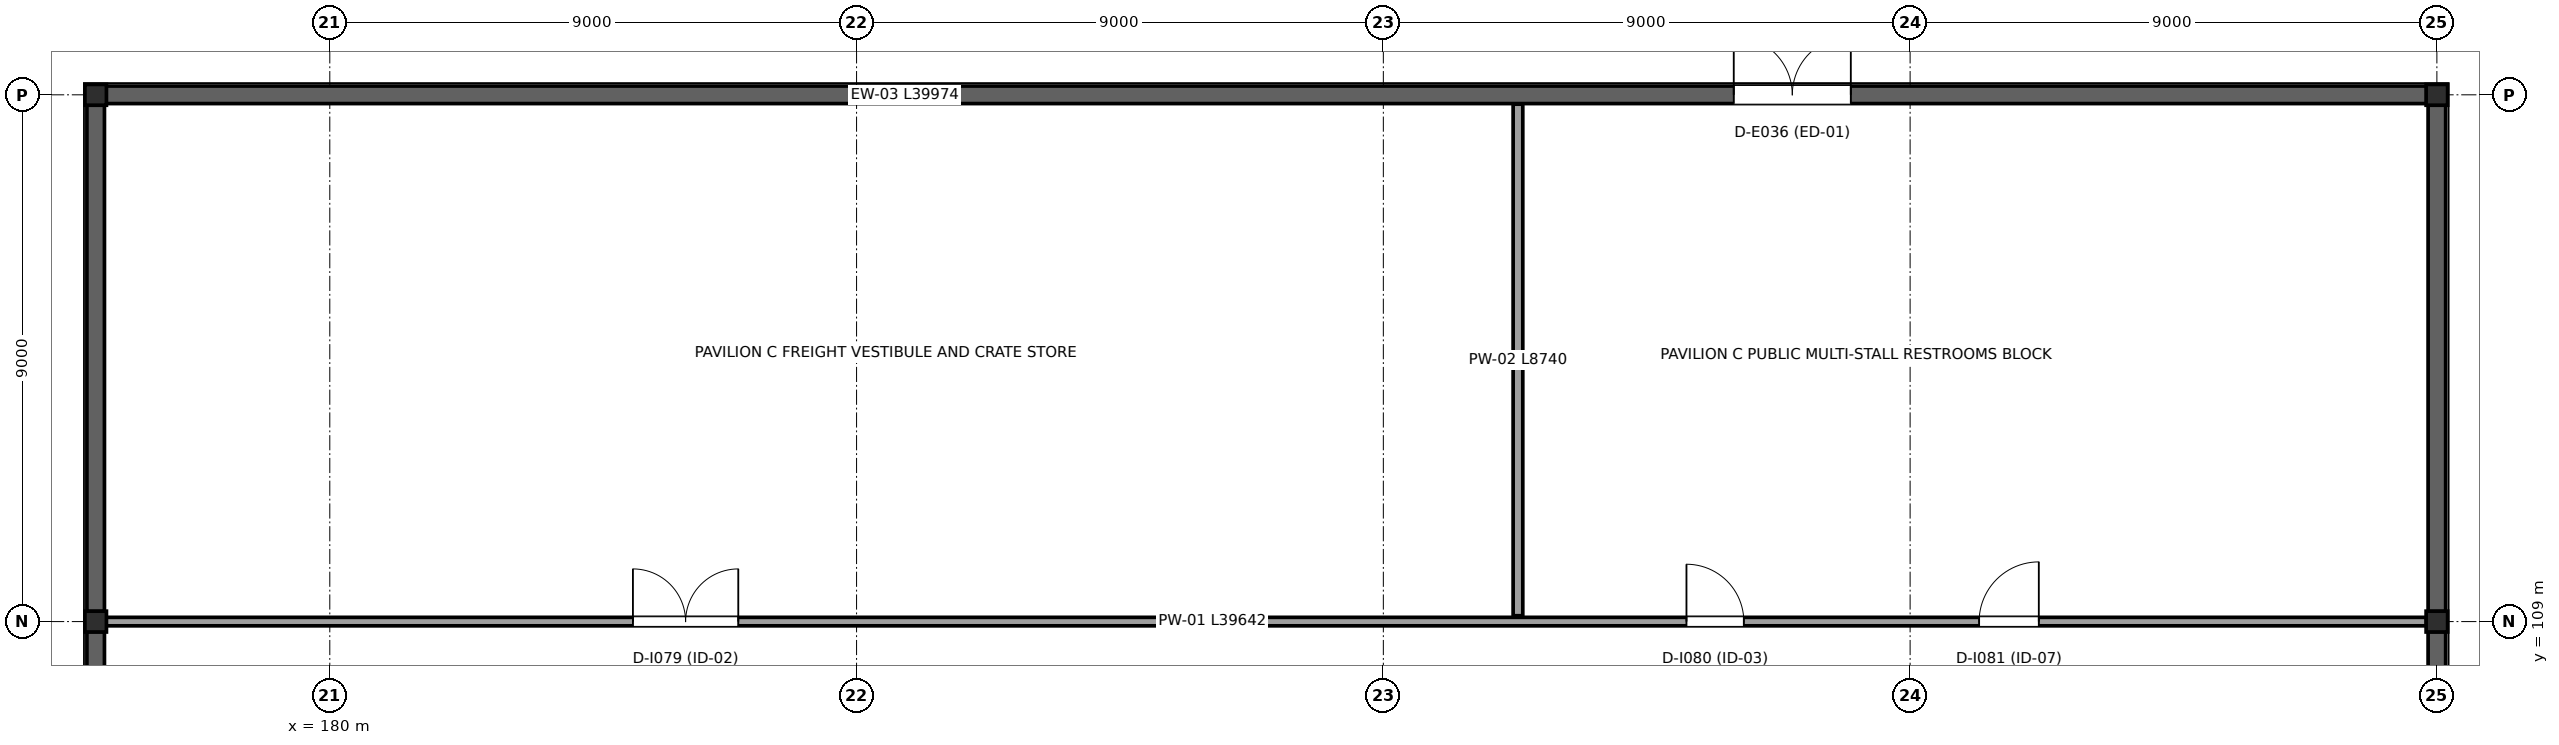
"""IFC4 building model, lengths in metres.
Left out: names, types, materials, properties, quantities, classifications, styles, units other than length and angle.
Written with IfcOpenShell. Run it as: python <this file> out.ifc"""

import sys

from ifc_helpers import new_model, si_unit, direction, frame, frame_2d, origin, origin_2d, place, context, subcontext, project, spatial, rectangle, i_section, extrude, element, fill, save


model = new_model("IFC4")
c1 = context("Model", 3, precision=1e-05, world=origin(), true_north=direction((0.0, 1.0)))
c2 = subcontext(c1, "Body", "Model", "MODEL_VIEW")
j1 = project(units=[si_unit("LENGTHUNIT", "METRE"), si_unit("PLANEANGLEUNIT", "RADIAN")], contexts=[c1])
p1 = place(None, origin())
s1 = spatial("IfcSite", under=j1, at=p1, CompositionType="ELEMENT")
p2 = place(p1, origin())
s2 = spatial("IfcBuilding", under=s1, at=p2, CompositionType="ELEMENT")
p3 = place(p2, origin())
s3 = spatial("IfcBuildingStorey", under=s2, at=p3, CompositionType="ELEMENT", Elevation=0.0)
for number, where, z_axis, x_axis in (
    (1, (176.0, 109.0, 0.0), (0.0, 0.0, 1.0), (1.0, 0.0, 0.0)),
    (2, (176.0, 118.0, 0.0), (0.0, 0.0, 1.0), (1.0, 0.0, 0.0)),
    (3, (216.0, 109.0, 0.0), (0.0, 0.0, 1.0), (1.0, 0.0, 0.0)),
    (4, (216.0, 118.0, 0.0), (0.0, 0.0, 1.0), (1.0, 0.0, 0.0)),
):
    element("IfcColumn", number, at=place(p3, frame(where, z_axis=z_axis, x_axis=x_axis)), inside=s3, PredefinedType="COLUMN", context=c2, shape_type="SweptSolid", body=[
        extrude(i_section(OverallWidth=0.368, OverallDepth=0.356, WebThickness=0.011, FlangeThickness=0.018, at=origin_2d()), origin(), (0.0, 0.0, 1.0), 6.0),
    ])
p4 = place(p3, frame((216.0, 108.828, 0.0), z_axis=(0.0, 0.0, 1.0), x_axis=(0.0, -1.0, 0.0)))
e5 = element("IfcWall", 5, at=p4, inside=s3, PredefinedType="STANDARD", context=c2, shape_type="SweptSolid", body=[
    extrude(rectangle(XDim=8.656, YDim=0.3, at=frame_2d((4.328, 0.0))), origin(), (0.0, 0.0, 1.0), 10.68),
])
p5 = place(p4, frame((3.356, 0.0, 0.0)))
e6 = element("IfcOpeningElement", 6, at=p5, cuts=e5, PredefinedType="OPENING", context=c2, shape_type="SweptSolid", body=[
    extrude(rectangle(XDim=2.4, YDim=2.6, at=frame_2d((1.2, 1.3))), frame((0.0, 0.16, 0.0), z_axis=(0.0, -1.0, 0.0), x_axis=(1.0, 0.0, 0.0)), (0.0, 0.0, 1.0), 0.32),
])
for number, where, z_axis, x_axis in (
    (7, (176.0, 100.172, 0.0), (0.0, 0.0, 1.0), (0.0, 1.0, 0.0)),
    (8, (216.0, 117.828, 0.0), (0.0, 0.0, 1.0), (0.0, -1.0, 0.0)),
    (9, (176.0, 109.172, 0.0), (0.0, 0.0, 1.0), (0.0, 1.0, 0.0)),
):
    element("IfcWall", number, at=place(p3, frame(where, z_axis=z_axis, x_axis=x_axis)), inside=s3, PredefinedType="STANDARD", context=c2, shape_type="SweptSolid", body=[
        extrude(rectangle(XDim=8.656, YDim=0.3, at=frame_2d((4.328, 0.0))), origin(), (0.0, 0.0, 1.0), 10.68),
    ])
p6 = place(p3, frame((176.013, 118.0, 0.0), z_axis=(0.0, 0.0, 1.0), x_axis=(1.0, 0.0, 0.0)))
e10 = element("IfcWall", 10, at=p6, inside=s3, PredefinedType="STANDARD", context=c2, shape_type="SweptSolid", body=[
    extrude(rectangle(XDim=39.974, YDim=0.3, at=frame_2d((19.987, 0.0))), origin(), (0.0, 0.0, 1.0), 10.8),
])
p7 = place(p6, frame((27.974, 0.0, 0.0)))
e11 = element("IfcOpeningElement", 11, at=p7, cuts=e10, PredefinedType="OPENING", context=c2, shape_type="SweptSolid", body=[
    extrude(rectangle(XDim=2.0, YDim=2.4, at=frame_2d((1.0, 1.2))), frame((0.0, 0.16, 0.0), z_axis=(0.0, -1.0, 0.0), x_axis=(1.0, 0.0, 0.0)), (0.0, 0.0, 1.0), 0.32),
])
p8 = place(p3, frame((176.179, 109.0, 0.0), z_axis=(0.0, 0.0, 1.0), x_axis=(1.0, 0.0, 0.0)))
e12 = element("IfcWall", 12, at=p8, inside=s3, PredefinedType="PARTITIONING", context=c2, shape_type="SweptSolid", body=[
    extrude(rectangle(XDim=39.642, YDim=0.145, at=frame_2d((19.821, 0.0))), origin(), (0.0, 0.0, 1.0), 8.8),
])
p9 = place(p8, frame((9.0, 0.0, 0.0)))
e13 = element("IfcOpeningElement", 13, at=p9, cuts=e12, PredefinedType="OPENING", context=c2, shape_type="SweptSolid", body=[
    extrude(rectangle(XDim=1.8, YDim=2.3, at=frame_2d((0.9, 1.15))), frame((0.0, 0.083, 0.0), z_axis=(0.0, -1.0, 0.0), x_axis=(1.0, 0.0, 0.0)), (0.0, 0.0, 1.0), 0.165),
])
p10 = place(p8, frame((27.0, 0.0, 0.0)))
e14 = element("IfcOpeningElement", 14, at=p10, cuts=e12, PredefinedType="OPENING", context=c2, shape_type="SweptSolid", body=[
    extrude(rectangle(XDim=0.98, YDim=2.15, at=frame_2d((0.49, 1.075))), frame((0.0, 0.083, 0.0), z_axis=(0.0, -1.0, 0.0), x_axis=(1.0, 0.0, 0.0)), (0.0, 0.0, 1.0), 0.165),
])
p11 = place(p8, frame((32.0, 0.0, 0.0)))
e15 = element("IfcOpeningElement", 15, at=p11, cuts=e12, PredefinedType="OPENING", context=c2, shape_type="SweptSolid", body=[
    extrude(rectangle(XDim=1.02, YDim=2.16, at=frame_2d((0.51, 1.08))), frame((0.0, 0.083, 0.0), z_axis=(0.0, -1.0, 0.0), x_axis=(1.0, 0.0, 0.0)), (0.0, 0.0, 1.0), 0.165),
])
p12 = place(p3, frame((200.3, 109.1, 0.0), z_axis=(0.0, 0.0, 1.0), x_axis=(0.0, 1.0, 0.0)))
e16 = element("IfcWall", 16, at=p12, inside=s3, PredefinedType="PARTITIONING", context=c2, shape_type="SweptSolid", body=[
    extrude(rectangle(XDim=8.74, YDim=0.165, at=frame_2d((4.37, 0.0))), origin(), (0.0, 0.0, 1.0), 8.8),
])
p13 = place(p7, origin())
e17 = element("IfcDoor", 17, at=p13, inside=s3, OperationType="DOUBLE_DOOR_SINGLE_SWING", PredefinedType="DOOR", context=c2, shape_type="SweptSolid", body=[
    extrude(rectangle(XDim=2.0, YDim=2.4, at=frame_2d((1.0, 1.2))), frame((0.0, 0.025, 0.0), z_axis=(0.0, -1.0, 0.0), x_axis=(1.0, 0.0, 0.0)), (0.0, 0.0, 1.0), 0.05),
])
fill(e11, e17)
p14 = place(p9, origin())
e18 = element("IfcDoor", 18, at=p14, inside=s3, OperationType="DOUBLE_DOOR_SINGLE_SWING", PredefinedType="DOOR", context=c2, shape_type="SweptSolid", body=[
    extrude(rectangle(XDim=1.8, YDim=2.3, at=frame_2d((0.9, 1.15))), frame((0.0, 0.025, 0.0), z_axis=(0.0, -1.0, 0.0), x_axis=(1.0, 0.0, 0.0)), (0.0, 0.0, 1.0), 0.05),
])
fill(e13, e18)
p15 = place(p10, origin())
e19 = element("IfcDoor", 19, at=p15, inside=s3, OperationType="SINGLE_SWING_LEFT", PredefinedType="DOOR", context=c2, shape_type="SweptSolid", body=[
    extrude(rectangle(XDim=0.98, YDim=2.15, at=frame_2d((0.49, 1.075))), frame((0.0, 0.025, 0.0), z_axis=(0.0, -1.0, 0.0), x_axis=(1.0, 0.0, 0.0)), (0.0, 0.0, 1.0), 0.05),
])
fill(e14, e19)
p16 = place(p11, origin())
e20 = element("IfcDoor", 20, at=p16, inside=s3, OperationType="SINGLE_SWING_RIGHT", PredefinedType="DOOR", context=c2, shape_type="SweptSolid", body=[
    extrude(rectangle(XDim=1.02, YDim=2.16, at=frame_2d((0.51, 1.08))), frame((0.0, 0.025, 0.0), z_axis=(0.0, -1.0, 0.0), x_axis=(1.0, 0.0, 0.0)), (0.0, 0.0, 1.0), 0.05),
])
fill(e15, e20)
save(model, sys.argv[1])
